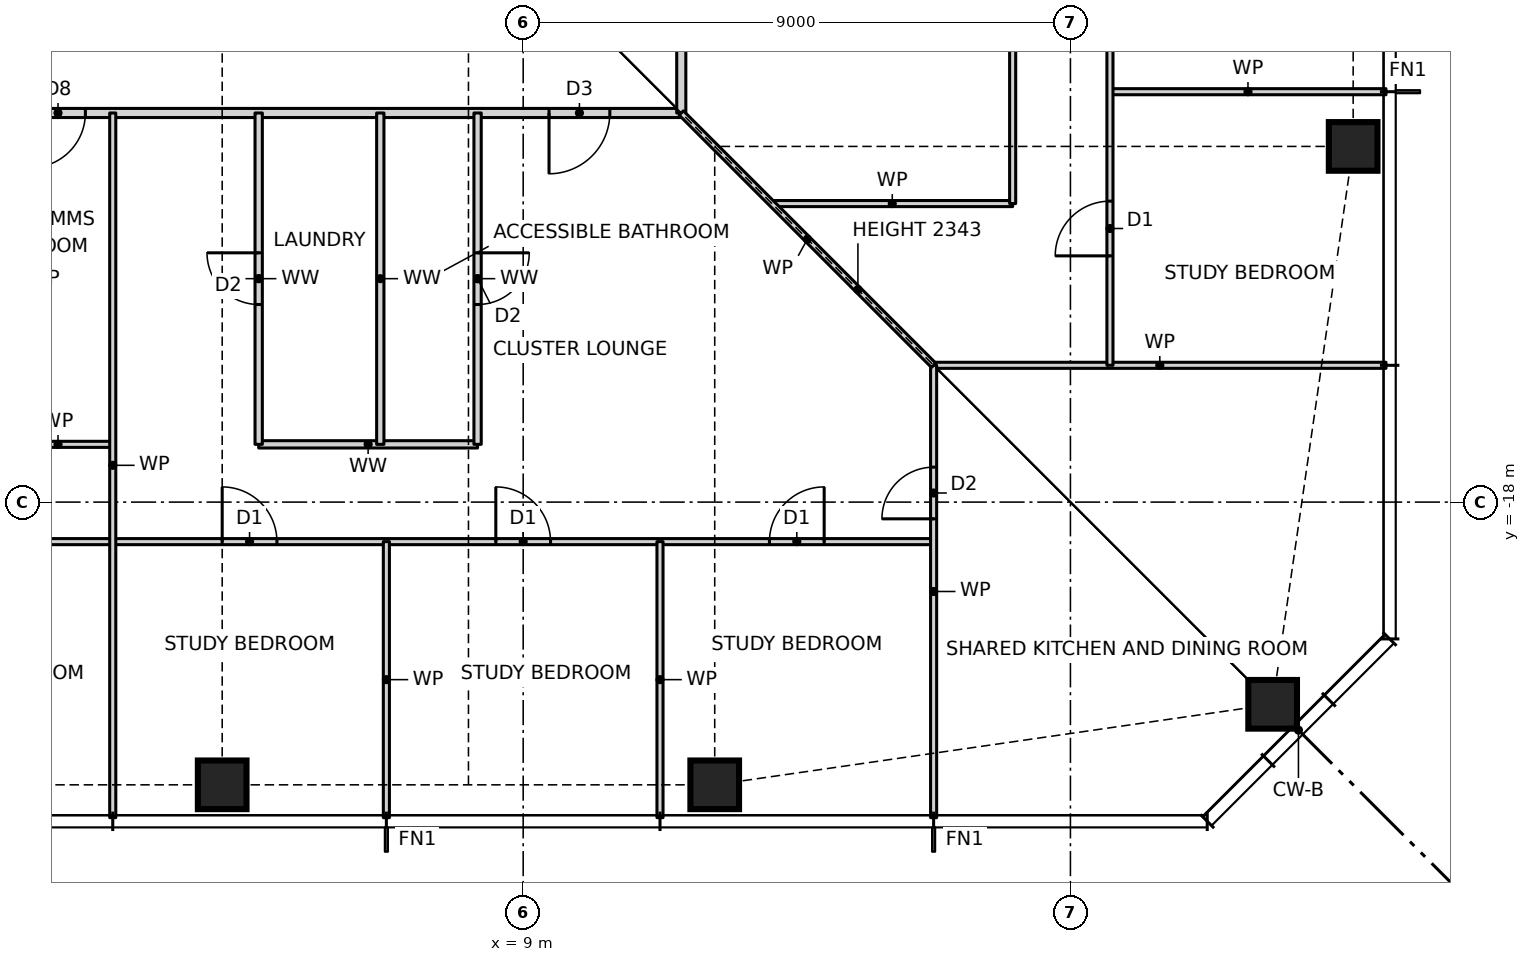
"""IFC4 building model, lengths in metres.
Left out: names, types, materials, properties, quantities, classifications, styles, units other than length and angle.
Written with IfcOpenShell. Run it as: python <this file> out.ifc"""

import sys

from ifc_helpers import new_model, si_unit, direction, frame, frame_2d, origin, origin_2d, place, context, subcontext, project, spatial, rectangle, hollow_rectangle, extrude, element, fill, save


model = new_model("IFC4")
c1 = context("Model", 3, precision=1e-05, world=origin(), true_north=direction((0.0, 1.0)))
c2 = subcontext(c1, "Body", "Model", "MODEL_VIEW")
j1 = project(units=[si_unit("LENGTHUNIT", "METRE"), si_unit("PLANEANGLEUNIT", "RADIAN")], contexts=[c1])
p1 = place(None, origin())
s1 = spatial("IfcSite", under=j1, at=p1, CompositionType="ELEMENT")
p2 = place(p1, origin())
s2 = spatial("IfcBuilding", under=s1, at=p2, CompositionType="ELEMENT")
p3 = place(p2, frame((0.0, 0.0, 46.5)))
s3 = spatial("IfcBuildingStorey", under=s2, at=p3, CompositionType="ELEMENT", Elevation=46.5)
for number, where, z_axis, x_axis in (
    (1, (4.05, -22.65, 0.0), (0.0, 0.0, 1.0), (1.0, 0.0, 0.0)),
    (2, (12.15, -22.65, 0.0), (0.0, 0.0, 1.0), (1.0, 0.0, 0.0)),
    (3, (21.326, -21.326, 0.0), (0.0, 0.0, 1.0), (1.0, 0.0, 0.0)),
    (4, (22.65, -12.15, 0.0), (0.0, 0.0, 1.0), (1.0, 0.0, 0.0)),
):
    element("IfcColumn", number, at=place(p3, frame(where, z_axis=z_axis, x_axis=x_axis)), inside=s3, PredefinedType="COLUMN", context=c2, shape_type="SweptSolid", body=[
        extrude(hollow_rectangle(XDim=0.8, YDim=0.8, WallThickness=0.09, at=origin_2d()), origin(), (0.0, 0.0, 1.0), 3.5),
    ])
p4 = place(p3, frame((-15.75, -18.65, 0.0), z_axis=(0.0, 0.0, 1.0), x_axis=(1.0, 0.0, 0.0)))
e5 = element("IfcWall", 5, at=p4, inside=s3, PredefinedType="PARTITIONING", context=c2, shape_type="SweptSolid", body=[
    extrude(rectangle(XDim=31.5, YDim=0.1, at=frame_2d((15.75, 0.0))), origin(), (0.0, 0.0, 1.0), 3.27),
])
p5 = place(p4, frame((1.8, 0.0, 0.0)))
e6 = element("IfcOpeningElement", 6, at=p5, cuts=e5, PredefinedType="OPENING", context=c2, shape_type="SweptSolid", body=[
    extrude(rectangle(XDim=0.9, YDim=2.1, at=frame_2d((0.45, 1.05))), frame((0.0, 0.06, 0.0), z_axis=(0.0, -1.0, 0.0), x_axis=(1.0, 0.0, 0.0)), (0.0, 0.0, 1.0), 0.12),
])
p6 = place(p4, frame((6.3, 0.0, 0.0)))
e7 = element("IfcOpeningElement", 7, at=p6, cuts=e5, PredefinedType="OPENING", context=c2, shape_type="SweptSolid", body=[
    extrude(rectangle(XDim=0.9, YDim=2.1, at=frame_2d((0.45, 1.05))), frame((0.0, 0.06, 0.0), z_axis=(0.0, -1.0, 0.0), x_axis=(1.0, 0.0, 0.0)), (0.0, 0.0, 1.0), 0.12),
])
p7 = place(p4, frame((10.8, 0.0, 0.0)))
e8 = element("IfcOpeningElement", 8, at=p7, cuts=e5, PredefinedType="OPENING", context=c2, shape_type="SweptSolid", body=[
    extrude(rectangle(XDim=0.9, YDim=2.1, at=frame_2d((0.45, 1.05))), frame((0.0, 0.06, 0.0), z_axis=(0.0, -1.0, 0.0), x_axis=(1.0, 0.0, 0.0)), (0.0, 0.0, 1.0), 0.12),
])
p8 = place(p4, frame((15.3, 0.0, 0.0)))
e9 = element("IfcOpeningElement", 9, at=p8, cuts=e5, PredefinedType="OPENING", context=c2, shape_type="SweptSolid", body=[
    extrude(rectangle(XDim=0.9, YDim=2.1, at=frame_2d((0.45, 1.05))), frame((0.0, 0.06, 0.0), z_axis=(0.0, -1.0, 0.0), x_axis=(1.0, 0.0, 0.0)), (0.0, 0.0, 1.0), 0.12),
])
p9 = place(p4, frame((19.8, 0.0, 0.0)))
e10 = element("IfcOpeningElement", 10, at=p9, cuts=e5, PredefinedType="OPENING", context=c2, shape_type="SweptSolid", body=[
    extrude(rectangle(XDim=0.9, YDim=2.1, at=frame_2d((0.45, 1.05))), frame((0.0, 0.06, 0.0), z_axis=(0.0, -1.0, 0.0), x_axis=(1.0, 0.0, 0.0)), (0.0, 0.0, 1.0), 0.12),
])
p10 = place(p4, frame((24.3, 0.0, 0.0)))
e11 = element("IfcOpeningElement", 11, at=p10, cuts=e5, PredefinedType="OPENING", context=c2, shape_type="SweptSolid", body=[
    extrude(rectangle(XDim=0.9, YDim=2.1, at=frame_2d((0.45, 1.05))), frame((0.0, 0.06, 0.0), z_axis=(0.0, -1.0, 0.0), x_axis=(1.0, 0.0, 0.0)), (0.0, 0.0, 1.0), 0.12),
])
p11 = place(p4, frame((28.8, 0.0, 0.0)))
e12 = element("IfcOpeningElement", 12, at=p11, cuts=e5, PredefinedType="OPENING", context=c2, shape_type="SweptSolid", body=[
    extrude(rectangle(XDim=0.9, YDim=2.1, at=frame_2d((0.45, 1.05))), frame((0.0, 0.06, 0.0), z_axis=(0.0, -1.0, 0.0), x_axis=(1.0, 0.0, 0.0)), (0.0, 0.0, 1.0), 0.12),
])
p12 = place(p3, frame((0.45, -17.05, 0.0), z_axis=(0.0, 0.0, 1.0), x_axis=(1.0, 0.0, 0.0)))
e13 = element("IfcWall", 13, at=p12, inside=s3, PredefinedType="PARTITIONING", context=c2, shape_type="SweptSolid", body=[
    extrude(rectangle(XDim=1.8, YDim=0.1, at=frame_2d((0.9, 0.0))), origin(), (0.0, 0.0, 1.0), 3.27),
])
p13 = place(p3, frame((4.65, -17.05, 0.0), z_axis=(0.0, 0.0, 1.0), x_axis=(1.0, 0.0, 0.0)))
e14 = element("IfcWall", 14, at=p13, inside=s3, PredefinedType="PARTITIONING", context=c2, shape_type="SweptSolid", body=[
    extrude(rectangle(XDim=3.6, YDim=0.12, at=frame_2d((1.8, 0.0))), origin(), (0.0, 0.0, 1.0), 3.27),
])
p14 = place(p3, frame((15.75, -15.75, 0.0), z_axis=(0.0, 0.0, 1.0), x_axis=(1.0, 0.0, 0.0)))
e15 = element("IfcWall", 15, at=p14, inside=s3, PredefinedType="PARTITIONING", context=c2, shape_type="SweptSolid", body=[
    extrude(rectangle(XDim=7.44, YDim=0.1, at=frame_2d((3.72, 0.0))), origin(), (0.0, 0.0, 1.0), 3.27),
])
p15 = place(p3, frame((13.09, -13.09, 0.0), z_axis=(0.0, 0.0, 1.0), x_axis=(1.0, 0.0, 0.0)))
e16 = element("IfcWall", 16, at=p15, inside=s3, PredefinedType="PARTITIONING", context=c2, shape_type="SweptSolid", body=[
    extrude(rectangle(XDim=3.96, YDim=0.1, at=frame_2d((1.98, 0.0))), origin(), (0.0, 0.0, 1.0), 3.27),
])
p16 = place(p3, frame((-12.6, -11.6, 0.0), z_axis=(0.0, 0.0, 1.0), x_axis=(1.0, 0.0, 0.0)))
e17 = element("IfcWall", 17, at=p16, inside=s3, PredefinedType="PARTITIONING", context=c2, shape_type="SweptSolid", body=[
    extrude(rectangle(XDim=24.2, YDim=0.15, at=frame_2d((12.1, 0.0))), origin(), (0.0, 0.0, 1.0), 3.27),
])
p17 = place(p16, frame((2.64, 0.0, 0.0)))
e18 = element("IfcOpeningElement", 18, at=p17, cuts=e17, PredefinedType="OPENING", context=c2, shape_type="SweptSolid", body=[
    extrude(rectangle(XDim=1.0, YDim=2.1, at=frame_2d((0.5, 1.05))), frame((0.0, 0.085, 0.0), z_axis=(0.0, -1.0, 0.0), x_axis=(1.0, 0.0, 0.0)), (0.0, 0.0, 1.0), 0.17),
])
p18 = place(p16, frame((13.5, 0.0, 0.0)))
e19 = element("IfcOpeningElement", 19, at=p18, cuts=e17, PredefinedType="OPENING", context=c2, shape_type="SweptSolid", body=[
    extrude(rectangle(XDim=0.9, YDim=2.1, at=frame_2d((0.45, 1.05))), frame((0.0, 0.085, 0.0), z_axis=(0.0, -1.0, 0.0), x_axis=(1.0, 0.0, 0.0)), (0.0, 0.0, 1.0), 0.17),
])
p19 = place(p16, frame((22.025, 0.0, 0.0)))
e20 = element("IfcOpeningElement", 20, at=p19, cuts=e17, PredefinedType="OPENING", context=c2, shape_type="SweptSolid", body=[
    extrude(rectangle(XDim=1.0, YDim=2.1, at=frame_2d((0.5, 1.05))), frame((0.0, 0.085, 0.0), z_axis=(0.0, -1.0, 0.0), x_axis=(1.0, 0.0, 0.0)), (0.0, 0.0, 1.0), 0.17),
])
p20 = place(p3, frame((18.65, -11.25, 0.0), z_axis=(0.0, 0.0, 1.0), x_axis=(1.0, 0.0, 0.0)))
e21 = element("IfcWall", 21, at=p20, inside=s3, PredefinedType="PARTITIONING", context=c2, shape_type="SweptSolid", body=[
    extrude(rectangle(XDim=4.54, YDim=0.1, at=frame_2d((2.27, 0.0))), origin(), (0.0, 0.0, 1.0), 3.27),
])
p21 = place(p3, frame((18.65, -15.75, 0.0), z_axis=(0.0, 0.0, 1.0), x_axis=(0.0, 1.0, 0.0)))
e22 = element("IfcWall", 22, at=p21, inside=s3, PredefinedType="PARTITIONING", context=c2, shape_type="SweptSolid", body=[
    extrude(rectangle(XDim=31.5, YDim=0.1, at=frame_2d((15.75, 0.0))), origin(), (0.0, 0.0, 1.0), 3.27),
])
p22 = place(p21, frame((1.8, 0.0, 0.0)))
e23 = element("IfcOpeningElement", 23, at=p22, cuts=e22, PredefinedType="OPENING", context=c2, shape_type="SweptSolid", body=[
    extrude(rectangle(XDim=0.9, YDim=2.1, at=frame_2d((0.45, 1.05))), frame((0.0, 0.06, 0.0), z_axis=(0.0, -1.0, 0.0), x_axis=(1.0, 0.0, 0.0)), (0.0, 0.0, 1.0), 0.12),
])
p23 = place(p21, frame((6.3, 0.0, 0.0)))
e24 = element("IfcOpeningElement", 24, at=p23, cuts=e22, PredefinedType="OPENING", context=c2, shape_type="SweptSolid", body=[
    extrude(rectangle(XDim=0.9, YDim=2.1, at=frame_2d((0.45, 1.05))), frame((0.0, 0.06, 0.0), z_axis=(0.0, -1.0, 0.0), x_axis=(1.0, 0.0, 0.0)), (0.0, 0.0, 1.0), 0.12),
])
p24 = place(p21, frame((10.8, 0.0, 0.0)))
e25 = element("IfcOpeningElement", 25, at=p24, cuts=e22, PredefinedType="OPENING", context=c2, shape_type="SweptSolid", body=[
    extrude(rectangle(XDim=0.9, YDim=2.1, at=frame_2d((0.45, 1.05))), frame((0.0, 0.06, 0.0), z_axis=(0.0, -1.0, 0.0), x_axis=(1.0, 0.0, 0.0)), (0.0, 0.0, 1.0), 0.12),
])
p25 = place(p21, frame((15.3, 0.0, 0.0)))
e26 = element("IfcOpeningElement", 26, at=p25, cuts=e22, PredefinedType="OPENING", context=c2, shape_type="SweptSolid", body=[
    extrude(rectangle(XDim=0.9, YDim=2.1, at=frame_2d((0.45, 1.05))), frame((0.0, 0.06, 0.0), z_axis=(0.0, -1.0, 0.0), x_axis=(1.0, 0.0, 0.0)), (0.0, 0.0, 1.0), 0.12),
])
p26 = place(p21, frame((19.8, 0.0, 0.0)))
e27 = element("IfcOpeningElement", 27, at=p26, cuts=e22, PredefinedType="OPENING", context=c2, shape_type="SweptSolid", body=[
    extrude(rectangle(XDim=0.9, YDim=2.1, at=frame_2d((0.45, 1.05))), frame((0.0, 0.06, 0.0), z_axis=(0.0, -1.0, 0.0), x_axis=(1.0, 0.0, 0.0)), (0.0, 0.0, 1.0), 0.12),
])
p27 = place(p21, frame((24.3, 0.0, 0.0)))
e28 = element("IfcOpeningElement", 28, at=p27, cuts=e22, PredefinedType="OPENING", context=c2, shape_type="SweptSolid", body=[
    extrude(rectangle(XDim=0.9, YDim=2.1, at=frame_2d((0.45, 1.05))), frame((0.0, 0.06, 0.0), z_axis=(0.0, -1.0, 0.0), x_axis=(1.0, 0.0, 0.0)), (0.0, 0.0, 1.0), 0.12),
])
p28 = place(p21, frame((28.8, 0.0, 0.0)))
e29 = element("IfcOpeningElement", 29, at=p28, cuts=e22, PredefinedType="OPENING", context=c2, shape_type="SweptSolid", body=[
    extrude(rectangle(XDim=0.9, YDim=2.1, at=frame_2d((0.45, 1.05))), frame((0.0, 0.06, 0.0), z_axis=(0.0, -1.0, 0.0), x_axis=(1.0, 0.0, 0.0)), (0.0, 0.0, 1.0), 0.12),
])
p29 = place(p3, frame((17.05, -13.09, 0.0), z_axis=(0.0, 0.0, 1.0), x_axis=(0.0, 1.0, 0.0)))
e30 = element("IfcWall", 30, at=p29, inside=s3, PredefinedType="PARTITIONING", context=c2, shape_type="SweptSolid", body=[
    extrude(rectangle(XDim=21.34, YDim=0.1, at=frame_2d((10.67, 0.0))), origin(), (0.0, 0.0, 1.0), 3.27),
])
p30 = place(p29, frame((4.91, 0.0, 0.0)))
e31 = element("IfcOpeningElement", 31, at=p30, cuts=e30, PredefinedType="OPENING", context=c2, shape_type="SweptSolid", body=[
    extrude(rectangle(XDim=0.85, YDim=2.1, at=frame_2d((0.425, 1.05))), frame((0.0, 0.06, 0.0), z_axis=(0.0, -1.0, 0.0), x_axis=(1.0, 0.0, 0.0)), (0.0, 0.0, 1.0), 0.12),
])
p31 = place(p29, frame((15.58, 0.0, 0.0)))
e32 = element("IfcOpeningElement", 32, at=p31, cuts=e30, PredefinedType="OPENING", context=c2, shape_type="SweptSolid", body=[
    extrude(rectangle(XDim=0.85, YDim=2.1, at=frame_2d((0.425, 1.05))), frame((0.0, 0.06, 0.0), z_axis=(0.0, -1.0, 0.0), x_axis=(1.0, 0.0, 0.0)), (0.0, 0.0, 1.0), 0.12),
])
p32 = place(p3, frame((15.75, -23.19, 0.0), z_axis=(0.0, 0.0, 1.0), x_axis=(0.0, 1.0, 0.0)))
e33 = element("IfcWall", 33, at=p32, inside=s3, PredefinedType="PARTITIONING", context=c2, shape_type="SweptSolid", body=[
    extrude(rectangle(XDim=7.44, YDim=0.1, at=frame_2d((3.72, 0.0))), origin(), (0.0, 0.0, 1.0), 3.27),
])
p33 = place(p32, frame((4.915, 0.0, 0.0)))
e34 = element("IfcOpeningElement", 34, at=p33, cuts=e33, PredefinedType="OPENING", context=c2, shape_type="SweptSolid", body=[
    extrude(rectangle(XDim=0.85, YDim=2.1, at=frame_2d((0.425, 1.05))), frame((0.0, 0.06, 0.0), z_axis=(0.0, -1.0, 0.0), x_axis=(1.0, 0.0, 0.0)), (0.0, 0.0, 1.0), 0.12),
])
p34 = place(p3, frame((11.6, -11.6, 0.0), z_axis=(0.0, 0.0, 1.0), x_axis=(0.0, 1.0, 0.0)))
e35 = element("IfcWall", 35, at=p34, inside=s3, PredefinedType="PARTITIONING", context=c2, shape_type="SweptSolid", body=[
    extrude(rectangle(XDim=23.2, YDim=0.15, at=frame_2d((11.6, 0.0))), origin(), (0.0, 0.0, 1.0), 3.27),
])
p35 = place(p34, frame((20.55, 0.0, 0.0)))
e36 = element("IfcOpeningElement", 36, at=p35, cuts=e35, PredefinedType="OPENING", context=c2, shape_type="SweptSolid", body=[
    extrude(rectangle(XDim=1.0, YDim=2.1, at=frame_2d((0.5, 1.05))), frame((0.0, 0.085, 0.0), z_axis=(0.0, -1.0, 0.0), x_axis=(1.0, 0.0, 0.0)), (0.0, 0.0, 1.0), 0.17),
])
p36 = place(p3, frame((11.25, -23.19, 0.0), z_axis=(0.0, 0.0, 1.0), x_axis=(0.0, 1.0, 0.0)))
e37 = element("IfcWall", 37, at=p36, inside=s3, PredefinedType="PARTITIONING", context=c2, shape_type="SweptSolid", body=[
    extrude(rectangle(XDim=4.54, YDim=0.1, at=frame_2d((2.27, 0.0))), origin(), (0.0, 0.0, 1.0), 3.27),
])
p37 = place(p3, frame((8.25, -17.05, 0.0), z_axis=(0.0, 0.0, 1.0), x_axis=(0.0, 1.0, 0.0)))
e38 = element("IfcWall", 38, at=p37, inside=s3, PredefinedType="PARTITIONING", context=c2, shape_type="SweptSolid", body=[
    extrude(rectangle(XDim=5.45, YDim=0.12, at=frame_2d((2.725, 0.0))), origin(), (0.0, 0.0, 1.0), 3.27),
])
p38 = place(p37, frame((2.3, 0.0, 0.0)))
e39 = element("IfcOpeningElement", 39, at=p38, cuts=e38, PredefinedType="OPENING", context=c2, shape_type="SweptSolid", body=[
    extrude(rectangle(XDim=0.85, YDim=2.1, at=frame_2d((0.425, 1.05))), frame((0.0, 0.07, 0.0), z_axis=(0.0, -1.0, 0.0), x_axis=(1.0, 0.0, 0.0)), (0.0, 0.0, 1.0), 0.14),
])
p39 = place(p3, frame((6.75, -23.19, 0.0), z_axis=(0.0, 0.0, 1.0), x_axis=(0.0, 1.0, 0.0)))
e40 = element("IfcWall", 40, at=p39, inside=s3, PredefinedType="PARTITIONING", context=c2, shape_type="SweptSolid", body=[
    extrude(rectangle(XDim=4.54, YDim=0.1, at=frame_2d((2.27, 0.0))), origin(), (0.0, 0.0, 1.0), 3.27),
])
p40 = place(p3, frame((6.65, -17.05, 0.0), z_axis=(0.0, 0.0, 1.0), x_axis=(0.0, 1.0, 0.0)))
e41 = element("IfcWall", 41, at=p40, inside=s3, PredefinedType="PARTITIONING", context=c2, shape_type="SweptSolid", body=[
    extrude(rectangle(XDim=5.45, YDim=0.12, at=frame_2d((2.725, 0.0))), origin(), (0.0, 0.0, 1.0), 3.27),
])
p41 = place(p3, frame((4.65, -17.05, 0.0), z_axis=(0.0, 0.0, 1.0), x_axis=(0.0, 1.0, 0.0)))
e42 = element("IfcWall", 42, at=p41, inside=s3, PredefinedType="PARTITIONING", context=c2, shape_type="SweptSolid", body=[
    extrude(rectangle(XDim=5.45, YDim=0.12, at=frame_2d((2.725, 0.0))), origin(), (0.0, 0.0, 1.0), 3.27),
])
p42 = place(p41, frame((2.3, 0.0, 0.0)))
e43 = element("IfcOpeningElement", 43, at=p42, cuts=e42, PredefinedType="OPENING", context=c2, shape_type="SweptSolid", body=[
    extrude(rectangle(XDim=0.85, YDim=2.1, at=frame_2d((0.425, 1.05))), frame((0.0, 0.07, 0.0), z_axis=(0.0, -1.0, 0.0), x_axis=(1.0, 0.0, 0.0)), (0.0, 0.0, 1.0), 0.14),
])
p43 = place(p3, frame((2.25, -23.19, 0.0), z_axis=(0.0, 0.0, 1.0), x_axis=(0.0, 1.0, 0.0)))
e44 = element("IfcWall", 44, at=p43, inside=s3, PredefinedType="PARTITIONING", context=c2, shape_type="SweptSolid", body=[
    extrude(rectangle(XDim=11.59, YDim=0.1, at=frame_2d((5.795, 0.0))), origin(), (0.0, 0.0, 1.0), 3.27),
])
p44 = place(p3, frame((15.75, -15.75, 0.0), z_axis=(0.0, 0.0, 1.0), x_axis=(-0.707106781187, 0.707106781187, 0.0)))
e45 = element("IfcWall", 45, at=p44, inside=s3, PredefinedType="PARTITIONING", context=c2, shape_type="SweptSolid", body=[
    extrude(rectangle(XDim=5.869, YDim=0.1, at=frame_2d((2.935, 0.0))), origin(), (0.0, 0.0, 1.0), 2.343),
])
p45 = place(p18, frame((0.9, 0.0, 0.0), z_axis=(0.0, 0.0, 1.0), x_axis=(-1.0, 0.0, 0.0)))
e46 = element("IfcDoor", 46, at=p45, inside=s3, OperationType="SINGLE_SWING_RIGHT", PredefinedType="DOOR", context=c2, shape_type="SweptSolid", body=[
    extrude(rectangle(XDim=0.9, YDim=2.1, at=frame_2d((0.45, 1.05))), frame((0.0, 0.025, 0.0), z_axis=(0.0, -1.0, 0.0), x_axis=(1.0, 0.0, 0.0)), (0.0, 0.0, 1.0), 0.05),
])
fill(e19, e46)
p46 = place(p9, origin())
e47 = element("IfcDoor", 47, at=p46, inside=s3, OperationType="SINGLE_SWING_LEFT", PredefinedType="DOOR", context=c2, shape_type="SweptSolid", body=[
    extrude(rectangle(XDim=0.9, YDim=2.1, at=frame_2d((0.45, 1.05))), frame((0.0, 0.025, 0.0), z_axis=(0.0, -1.0, 0.0), x_axis=(1.0, 0.0, 0.0)), (0.0, 0.0, 1.0), 0.05),
])
fill(e10, e47)
p47 = place(p10, origin())
e48 = element("IfcDoor", 48, at=p47, inside=s3, OperationType="SINGLE_SWING_LEFT", PredefinedType="DOOR", context=c2, shape_type="SweptSolid", body=[
    extrude(rectangle(XDim=0.9, YDim=2.1, at=frame_2d((0.45, 1.05))), frame((0.0, 0.025, 0.0), z_axis=(0.0, -1.0, 0.0), x_axis=(1.0, 0.0, 0.0)), (0.0, 0.0, 1.0), 0.05),
])
fill(e11, e48)
p48 = place(p11, origin())
e49 = element("IfcDoor", 49, at=p48, inside=s3, OperationType="SINGLE_SWING_RIGHT", PredefinedType="DOOR", context=c2, shape_type="SweptSolid", body=[
    extrude(rectangle(XDim=0.9, YDim=2.1, at=frame_2d((0.45, 1.05))), frame((0.0, 0.025, 0.0), z_axis=(0.0, -1.0, 0.0), x_axis=(1.0, 0.0, 0.0)), (0.0, 0.0, 1.0), 0.05),
])
fill(e12, e49)
p49 = place(p19, frame((1.0, 0.0, 0.0), z_axis=(0.0, 0.0, 1.0), x_axis=(-1.0, 0.0, 0.0)))
e50 = element("IfcDoor", 50, at=p49, inside=s3, OperationType="SINGLE_SWING_RIGHT", PredefinedType="DOOR", context=c2, shape_type="SweptSolid", body=[
    extrude(rectangle(XDim=1.0, YDim=2.1, at=frame_2d((0.5, 1.05))), frame((0.0, 0.025, 0.0), z_axis=(0.0, -1.0, 0.0), x_axis=(1.0, 0.0, 0.0)), (0.0, 0.0, 1.0), 0.05),
])
fill(e20, e50)
p50 = place(p42, origin())
e51 = element("IfcDoor", 51, at=p50, inside=s3, OperationType="SINGLE_SWING_RIGHT", PredefinedType="DOOR", context=c2, shape_type="SweptSolid", body=[
    extrude(rectangle(XDim=0.85, YDim=2.1, at=frame_2d((0.425, 1.05))), frame((0.0, 0.025, 0.0), z_axis=(0.0, -1.0, 0.0), x_axis=(1.0, 0.0, 0.0)), (0.0, 0.0, 1.0), 0.05),
])
fill(e43, e51)
p51 = place(p38, frame((0.85, 0.0, 0.0), z_axis=(0.0, 0.0, 1.0), x_axis=(-1.0, 0.0, 0.0)))
e52 = element("IfcDoor", 52, at=p51, inside=s3, OperationType="SINGLE_SWING_LEFT", PredefinedType="DOOR", context=c2, shape_type="SweptSolid", body=[
    extrude(rectangle(XDim=0.85, YDim=2.1, at=frame_2d((0.425, 1.05))), frame((0.0, 0.025, 0.0), z_axis=(0.0, -1.0, 0.0), x_axis=(1.0, 0.0, 0.0)), (0.0, 0.0, 1.0), 0.05),
])
fill(e39, e52)
p52 = place(p22, origin())
e53 = element("IfcDoor", 53, at=p52, inside=s3, OperationType="SINGLE_SWING_LEFT", PredefinedType="DOOR", context=c2, shape_type="SweptSolid", body=[
    extrude(rectangle(XDim=0.9, YDim=2.1, at=frame_2d((0.45, 1.05))), frame((0.0, 0.025, 0.0), z_axis=(0.0, -1.0, 0.0), x_axis=(1.0, 0.0, 0.0)), (0.0, 0.0, 1.0), 0.05),
])
fill(e23, e53)
p53 = place(p33, origin())
e54 = element("IfcDoor", 54, at=p53, inside=s3, OperationType="SINGLE_SWING_LEFT", PredefinedType="DOOR", context=c2, shape_type="SweptSolid", body=[
    extrude(rectangle(XDim=0.85, YDim=2.1, at=frame_2d((0.425, 1.05))), frame((0.0, 0.025, 0.0), z_axis=(0.0, -1.0, 0.0), x_axis=(1.0, 0.0, 0.0)), (0.0, 0.0, 1.0), 0.05),
])
fill(e34, e54)
save(model, sys.argv[1])
